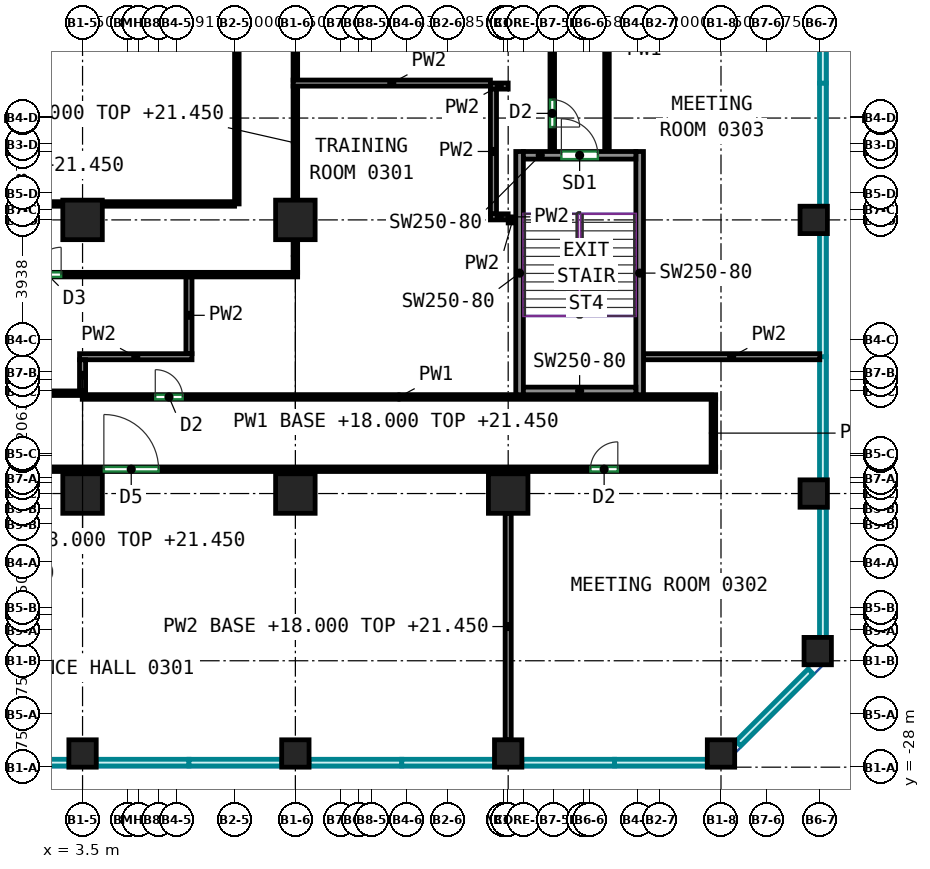
"""IFC4 building model, lengths in metres.
Left out: names, types, materials, properties, quantities, classifications, styles, units other than length and angle.
Written with IfcOpenShell. Run it as: python <this file> out.ifc"""

import sys

from ifc_helpers import new_model, si_unit, direction, frame, frame_2d, origin, origin_2d, place, context, subcontext, project, spatial, rectangle, extrude, source, transform, mapped, element, fill, save


model = new_model("IFC4")
c1 = context("Model", 3, precision=1e-05, world=origin(), true_north=direction((0.0, 1.0)))
c2 = subcontext(c1, "Body", "Model", "MODEL_VIEW")
j1 = project(units=[si_unit("LENGTHUNIT", "METRE"), si_unit("PLANEANGLEUNIT", "RADIAN")], contexts=[c1])
p1 = place(None, origin())
s1 = spatial("IfcSite", under=j1, at=p1, CompositionType="ELEMENT")
p2 = place(p1, origin())
s2 = spatial("IfcBuilding", under=s1, at=p2, CompositionType="ELEMENT")
p3 = place(p2, frame((0.0, 0.0, 18.0)))
s3 = spatial("IfcBuildingStorey", under=s2, at=p3, CompositionType="ELEMENT", Elevation=18.0)
m1 = source(origin(), c2, "Body", "SweptSolid", [
    extrude(rectangle(XDim=0.9, YDim=0.9, at=origin_2d()), origin(), (0.0, 0.0, 1.0), 4.1),
])
p4 = place(p3, frame((3.5, -27.55, 0.0), z_axis=(0.0, 0.0, 1.0), x_axis=(1.0, 0.0, 0.0)))
e1 = element("IfcColumn", 1, at=p4, inside=s3, PredefinedType="COLUMN", context=c2, shape_type="MappedRepresentation", body=[
    mapped(m1, transform((0.0, 0.0, 0.0))),
])
m2 = source(origin(), c2, "Body", "SweptSolid", [
    extrude(rectangle(XDim=1.3, YDim=1.3, at=origin_2d()), origin(), (0.0, 0.0, 1.0), 4.1),
])
for number, where, z_axis, x_axis in (
    (2, (3.5, -19.0, 0.0), (0.0, 0.0, 1.0), (1.0, 0.0, 0.0)),
    (3, (3.5, -10.0, 0.0), (0.0, 0.0, 1.0), (1.0, 0.0, 0.0)),
):
    element("IfcColumn", number, at=place(p3, frame(where, z_axis=z_axis, x_axis=x_axis)), inside=s3, PredefinedType="COLUMN", context=c2, shape_type="MappedRepresentation", body=[
        mapped(m2, transform((0.0, 0.0, 0.0))),
    ])
p5 = place(p3, frame((10.5, -27.55, 0.0), z_axis=(0.0, 0.0, 1.0), x_axis=(1.0, 0.0, 0.0)))
e4 = element("IfcColumn", 4, at=p5, inside=s3, PredefinedType="COLUMN", context=c2, shape_type="MappedRepresentation", body=[
    mapped(m1, transform((0.0, 0.0, 0.0))),
])
for number, where, z_axis, x_axis in (
    (5, (10.5, -19.0, 0.0), (0.0, 0.0, 1.0), (1.0, 0.0, 0.0)),
    (6, (10.5, -10.0, 0.0), (0.0, 0.0, 1.0), (1.0, 0.0, 0.0)),
):
    element("IfcColumn", number, at=place(p3, frame(where, z_axis=z_axis, x_axis=x_axis)), inside=s3, PredefinedType="COLUMN", context=c2, shape_type="MappedRepresentation", body=[
        mapped(m2, transform((0.0, 0.0, 0.0))),
    ])
p6 = place(p3, frame((17.5, -27.55, 0.0), z_axis=(0.0, 0.0, 1.0), x_axis=(1.0, 0.0, 0.0)))
e7 = element("IfcColumn", 7, at=p6, inside=s3, PredefinedType="COLUMN", context=c2, shape_type="MappedRepresentation", body=[
    mapped(m1, transform((0.0, 0.0, 0.0))),
])
p7 = place(p3, frame((17.5, -19.0, 0.0), z_axis=(0.0, 0.0, 1.0), x_axis=(1.0, 0.0, 0.0)))
e8 = element("IfcColumn", 8, at=p7, inside=s3, PredefinedType="COLUMN", context=c2, shape_type="MappedRepresentation", body=[
    mapped(m2, transform((0.0, 0.0, 0.0))),
])
for number, where, z_axis, x_axis in (
    (9, (24.5, -27.55, 0.0), (0.0, 0.0, 1.0), (1.0, 0.0, 0.0)),
    (10, (27.55, -19.0, 0.0), (0.0, 0.0, 1.0), (1.0, 0.0, 0.0)),
    (11, (27.55, -10.0, 0.0), (0.0, 0.0, 1.0), (1.0, 0.0, 0.0)),
    (12, (27.682, -24.182, 0.0), (0.0, 0.0, 1.0), (1.0, 0.0, 0.0)),
):
    element("IfcColumn", number, at=place(p3, frame(where, z_axis=z_axis, x_axis=x_axis)), inside=s3, PredefinedType="COLUMN", context=c2, shape_type="MappedRepresentation", body=[
        mapped(m1, transform((0.0, 0.0, 0.0))),
    ])
m3 = source(origin(), c2, "Body", "SweptSolid", [
    extrude(rectangle(XDim=8.0, YDim=0.25, at=frame_2d((4.0, 0.0))), origin(), (0.0, 0.0, 1.0), 4.1),
])
for number, where, z_axis, x_axis in (
    (13, (17.875, -15.75, 0.0), (0.0, 0.0, 1.0), (0.0, 1.0, 0.0)),
    (14, (21.825, -15.75, 0.0), (0.0, 0.0, 1.0), (0.0, 1.0, 0.0)),
):
    element("IfcWall", number, at=place(p3, frame(where, z_axis=z_axis, x_axis=x_axis)), inside=s3, PredefinedType="SHEAR", context=c2, shape_type="MappedRepresentation", body=[
        mapped(m3, transform((0.0, 0.0, 0.0))),
    ])
m4 = source(origin(), c2, "Body", "SweptSolid", [
    extrude(rectangle(XDim=3.7, YDim=0.25, at=frame_2d((1.85, 0.0))), origin(), (0.0, 0.0, 1.0), 4.1),
])
p8 = place(p3, frame((18.0, -15.625, 0.0), z_axis=(0.0, 0.0, 1.0), x_axis=(1.0, 0.0, 0.0)))
e15 = element("IfcWall", 15, at=p8, inside=s3, PredefinedType="SHEAR", context=c2, shape_type="MappedRepresentation", body=[
    mapped(m4, transform((0.0, 0.0, 0.0))),
])
p9 = place(p3, frame((18.0, -7.875, 0.0), z_axis=(0.0, 0.0, 1.0), x_axis=(1.0, 0.0, 0.0)))
e16 = element("IfcWall", 16, at=p9, inside=s3, PredefinedType="SHEAR", context=c2, shape_type="MappedRepresentation", body=[
    mapped(m4, transform((0.0, 0.0, 0.0))),
])
p10 = place(p9, frame((1.25, 0.0, 0.0)))
e17 = element("IfcOpeningElement", 17, at=p10, cuts=e16, PredefinedType="OPENING", context=c2, shape_type="SweptSolid", body=[
    extrude(rectangle(XDim=1.2, YDim=2.1, at=frame_2d((0.6, 1.05))), frame((0.0, 0.135, 0.0), z_axis=(0.0, -1.0, 0.0), x_axis=(1.0, 0.0, 0.0)), (0.0, 0.0, 1.0), 0.27),
])
p11 = place(p3, frame((-24.325, -18.2, 0.0), z_axis=(0.0, 0.0, 1.0), x_axis=(1.0, 0.0, 0.0)))
e18 = element("IfcWall", 18, at=p11, inside=s3, PredefinedType="PARTITIONING", context=c2, shape_type="SweptSolid", body=[
    extrude(rectangle(XDim=48.65, YDim=0.15, at=frame_2d((24.325, 0.0))), origin(), (0.0, 0.0, 1.0), 4.1),
])
p12 = place(p11, frame((7.818, 0.0, 0.0)))
e19 = element("IfcOpeningElement", 19, at=p12, cuts=e18, PredefinedType="OPENING", context=c2, shape_type="SweptSolid", body=[
    extrude(rectangle(XDim=0.9, YDim=2.1, at=frame_2d((0.45, 1.05))), frame((0.0, 0.085, 0.0), z_axis=(0.0, -1.0, 0.0), x_axis=(1.0, 0.0, 0.0)), (0.0, 0.0, 1.0), 0.17),
])
p13 = place(p11, frame((28.526, 0.0, 0.0)))
e20 = element("IfcOpeningElement", 20, at=p13, cuts=e18, PredefinedType="OPENING", context=c2, shape_type="SweptSolid", body=[
    extrude(rectangle(XDim=1.8, YDim=2.1, at=frame_2d((0.9, 1.05))), frame((0.0, 0.085, 0.0), z_axis=(0.0, -1.0, 0.0), x_axis=(1.0, 0.0, 0.0)), (0.0, 0.0, 1.0), 0.17),
])
p14 = place(p11, frame((44.531, 0.0, 0.0)))
e21 = element("IfcOpeningElement", 21, at=p14, cuts=e18, PredefinedType="OPENING", context=c2, shape_type="SweptSolid", body=[
    extrude(rectangle(XDim=0.9, YDim=2.1, at=frame_2d((0.45, 1.05))), frame((0.0, 0.085, 0.0), z_axis=(0.0, -1.0, 0.0), x_axis=(1.0, 0.0, 0.0)), (0.0, 0.0, 1.0), 0.17),
])
p15 = place(p3, frame((-5.875, -11.8, 0.0), z_axis=(0.0, 0.0, 1.0), x_axis=(1.0, 0.0, 0.0)))
e22 = element("IfcWall", 22, at=p15, inside=s3, PredefinedType="PARTITIONING", context=c2, shape_type="SweptSolid", body=[
    extrude(rectangle(XDim=16.45, YDim=0.15, at=frame_2d((8.225, 0.0))), origin(), (0.0, 0.0, 1.0), 4.1),
])
p16 = place(p15, frame((0.811, 0.0, 0.0)))
e23 = element("IfcOpeningElement", 23, at=p16, cuts=e22, PredefinedType="OPENING", context=c2, shape_type="SweptSolid", body=[
    extrude(rectangle(XDim=0.9, YDim=2.1, at=frame_2d((0.45, 1.05))), frame((0.0, 0.085, 0.0), z_axis=(0.0, -1.0, 0.0), x_axis=(1.0, 0.0, 0.0)), (0.0, 0.0, 1.0), 0.17),
])
p17 = place(p15, frame((7.771, 0.0, 0.0)))
e24 = element("IfcOpeningElement", 24, at=p17, cuts=e22, PredefinedType="OPENING", context=c2, shape_type="SweptSolid", body=[
    extrude(rectangle(XDim=0.9, YDim=2.1, at=frame_2d((0.45, 1.05))), frame((0.0, 0.085, 0.0), z_axis=(0.0, -1.0, 0.0), x_axis=(1.0, 0.0, 0.0)), (0.0, 0.0, 1.0), 0.17),
])
p18 = place(p3, frame((-5.875, -15.7, 0.0), z_axis=(0.0, 0.0, 1.0), x_axis=(1.0, 0.0, 0.0)))
e25 = element("IfcWall", 25, at=p18, inside=s3, PredefinedType="PARTITIONING", context=c2, shape_type="SweptSolid", body=[
    extrude(rectangle(XDim=9.385, YDim=0.15, at=frame_2d((4.692, 0.0))), origin(), (0.0, 0.0, 1.0), 4.1),
])
p19 = place(p3, frame((10.5, -9.35, 0.0), z_axis=(0.0, 0.0, 1.0), x_axis=(0.0, 1.0, 0.0)))
e26 = element("IfcWall", 26, at=p19, inside=s3, PredefinedType="PARTITIONING", context=c2, shape_type="SweptSolid", body=[
    extrude(rectangle(XDim=3.76, YDim=0.15, at=frame_2d((1.88, 0.0))), origin(), (0.0, 0.0, 1.0), 3.45),
])
p20 = place(p3, frame((10.5, -11.725, 0.0), z_axis=(0.0, 0.0, 1.0), x_axis=(0.0, 1.0, 0.0)))
e27 = element("IfcWall", 27, at=p20, inside=s3, PredefinedType="PARTITIONING", context=c2, shape_type="SweptSolid", body=[
    extrude(rectangle(XDim=1.075, YDim=0.15, at=frame_2d((0.538, 0.0))), origin(), (0.0, 0.0, 1.0), 3.45),
])
p21 = place(p3, frame((3.49, -15.825, 0.0), z_axis=(0.0, 0.0, 1.0), x_axis=(1.0, 0.0, 0.0)))
e28 = element("IfcWall", 28, at=p21, inside=s3, PredefinedType="PARTITIONING", context=c2, shape_type="SweptSolid", body=[
    extrude(rectangle(XDim=20.835, YDim=0.15, at=frame_2d((10.417, 0.0))), origin(), (0.0, 0.0, 1.0), 4.1),
])
p22 = place(p21, frame((2.402, 0.0, 0.0)))
e29 = element("IfcOpeningElement", 29, at=p22, cuts=e28, PredefinedType="OPENING", context=c2, shape_type="SweptSolid", body=[
    extrude(rectangle(XDim=0.9, YDim=2.1, at=frame_2d((0.45, 1.05))), frame((0.0, 0.085, 0.0), z_axis=(0.0, -1.0, 0.0), x_axis=(1.0, 0.0, 0.0)), (0.0, 0.0, 1.0), 0.17),
])
p23 = place(p3, frame((24.25, -18.125, 0.0), z_axis=(0.0, 0.0, 1.0), x_axis=(0.0, 1.0, 0.0)))
e30 = element("IfcWall", 30, at=p23, inside=s3, PredefinedType="PARTITIONING", context=c2, shape_type="SweptSolid", body=[
    extrude(rectangle(XDim=2.225, YDim=0.15, at=frame_2d((1.113, 0.0))), origin(), (0.0, 0.0, 1.0), 3.45),
])
p24 = place(p3, frame((20.75, -7.75, 0.0), z_axis=(0.0, 0.0, 1.0), x_axis=(0.0, 1.0, 0.0)))
e31 = element("IfcWall", 31, at=p24, inside=s3, PredefinedType="PARTITIONING", context=c2, shape_type="SweptSolid", body=[
    extrude(rectangle(XDim=6.66, YDim=0.15, at=frame_2d((3.33, 0.0))), origin(), (0.0, 0.0, 1.0), 4.1),
])
p25 = place(p24, frame((4.448, 0.0, 0.0)))
e32 = element("IfcOpeningElement", 32, at=p25, cuts=e31, PredefinedType="OPENING", context=c2, shape_type="SweptSolid", body=[
    extrude(rectangle(XDim=0.9, YDim=2.1, at=frame_2d((0.45, 1.05))), frame((0.0, 0.085, 0.0), z_axis=(0.0, -1.0, 0.0), x_axis=(1.0, 0.0, 0.0)), (0.0, 0.0, 1.0), 0.17),
])
p26 = place(p3, frame((10.5, -5.41, 0.0), z_axis=(0.0, 0.0, 1.0), x_axis=(0.0, 1.0, 0.0)))
e33 = element("IfcWall", 33, at=p26, inside=s3, PredefinedType="PARTITIONING", context=c2, shape_type="SweptSolid", body=[
    extrude(rectangle(XDim=3.76, YDim=0.15, at=frame_2d((1.88, 0.0))), origin(), (0.0, 0.0, 1.0), 3.45),
])
p27 = place(p3, frame((18.95, 5.525, 0.0), z_axis=(0.0, 0.0, 1.0), x_axis=(0.0, -1.0, 0.0)))
e34 = element("IfcWall", 34, at=p27, inside=s3, PredefinedType="PARTITIONING", context=c2, shape_type="SweptSolid", body=[
    extrude(rectangle(XDim=13.275, YDim=0.15, at=frame_2d((6.637, 0.0))), origin(), (0.0, 0.0, 1.0), 4.1),
])
p28 = place(p27, frame((11.571, 0.0, 0.0)))
e35 = element("IfcOpeningElement", 35, at=p28, cuts=e34, PredefinedType="OPENING", context=c2, shape_type="SweptSolid", body=[
    extrude(rectangle(XDim=0.9, YDim=2.1, at=frame_2d((0.45, 1.05))), frame((0.0, 0.085, 0.0), z_axis=(0.0, -1.0, 0.0), x_axis=(1.0, 0.0, 0.0)), (0.0, 0.0, 1.0), 0.17),
])
p29 = place(p3, frame((17.5, -27.1, 0.0), z_axis=(0.0, 0.0, 1.0), x_axis=(0.0, 1.0, 0.0)))
e36 = element("IfcWall", 36, at=p29, inside=s3, PredefinedType="PARTITIONING", context=c2, shape_type="SweptSolid", body=[
    extrude(rectangle(XDim=7.45, YDim=0.2, at=frame_2d((3.725, 0.0))), origin(), (0.0, 0.0, 1.0), 3.45),
])
p30 = place(p3, frame((7.0, -14.4, 0.0), z_axis=(0.0, 0.0, 1.0), x_axis=(0.0, 1.0, 0.0)))
e37 = element("IfcWall", 37, at=p30, inside=s3, PredefinedType="PARTITIONING", context=c2, shape_type="SweptSolid", body=[
    extrude(rectangle(XDim=2.524, YDim=0.2, at=frame_2d((1.262, 0.0))), origin(), (0.0, 0.0, 1.0), 4.1),
])
p31 = place(p3, frame((3.4, -14.5, 0.0), z_axis=(0.0, 0.0, 1.0), x_axis=(1.0, 0.0, 0.0)))
e38 = element("IfcWall", 38, at=p31, inside=s3, PredefinedType="PARTITIONING", context=c2, shape_type="SweptSolid", body=[
    extrude(rectangle(XDim=3.7, YDim=0.2, at=frame_2d((1.85, 0.0))), origin(), (0.0, 0.0, 1.0), 4.1),
])
p32 = place(p3, frame((3.5, -15.624, 0.0), z_axis=(0.0, 0.0, 1.0), x_axis=(0.0, 1.0, 0.0)))
e39 = element("IfcWall", 39, at=p32, inside=s3, PredefinedType="PARTITIONING", context=c2, shape_type="SweptSolid", body=[
    extrude(rectangle(XDim=1.024, YDim=0.2, at=frame_2d((0.512, 0.0))), origin(), (0.0, 0.0, 1.0), 3.45),
])
p33 = place(p3, frame((10.426, -5.5, 0.0), z_axis=(0.0, 0.0, 1.0), x_axis=(1.0, 0.0, 0.0)))
e40 = element("IfcWall", 40, at=p33, inside=s3, PredefinedType="PARTITIONING", context=c2, shape_type="SweptSolid", body=[
    extrude(rectangle(XDim=6.49, YDim=0.2, at=frame_2d((3.245, 0.0))), origin(), (0.0, 0.0, 1.0), 4.1),
])
p34 = place(p3, frame((16.916, -5.598, 0.0), z_axis=(0.0, 0.0, 1.0), x_axis=(1.0, 0.0, 0.0)))
e41 = element("IfcWall", 41, at=p34, inside=s3, PredefinedType="PARTITIONING", context=c2, shape_type="SweptSolid", body=[
    extrude(rectangle(XDim=0.584, YDim=0.2, at=frame_2d((0.292, 0.0))), origin(), (0.0, 0.0, 1.0), 4.1),
])
p35 = place(p3, frame((17.016, -9.8, 0.0), z_axis=(0.0, 0.0, 1.0), x_axis=(0.0, 1.0, 0.0)))
e42 = element("IfcWall", 42, at=p35, inside=s3, PredefinedType="PARTITIONING", context=c2, shape_type="SweptSolid", body=[
    extrude(rectangle(XDim=4.102, YDim=0.2, at=frame_2d((2.051, 0.0))), origin(), (0.0, 0.0, 1.0), 4.1),
])
p36 = place(p3, frame((17.5, -9.9, 0.0), z_axis=(0.0, 0.0, 1.0), x_axis=(-1.0, 0.0, 0.0)))
e43 = element("IfcWall", 43, at=p36, inside=s3, PredefinedType="PARTITIONING", context=c2, shape_type="SweptSolid", body=[
    extrude(rectangle(XDim=0.584, YDim=0.2, at=frame_2d((0.292, 0.0))), origin(), (0.0, 0.0, 1.0), 4.1),
])
p37 = place(p3, frame((17.8, -10.0, 0.0), z_axis=(0.0, 0.0, 1.0), x_axis=(-1.0, 0.0, 0.0)))
e44 = element("IfcWall", 44, at=p37, inside=s3, PredefinedType="PARTITIONING", context=c2, shape_type="SweptSolid", body=[
    extrude(rectangle(XDim=0.3, YDim=0.2, at=frame_2d((0.15, 0.0))), origin(), (0.0, 0.0, 1.0), 4.1),
])
p38 = place(p3, frame((21.95, -14.5, 0.0), z_axis=(0.0, 0.0, 1.0), x_axis=(1.0, 0.0, 0.0)))
e45 = element("IfcWall", 45, at=p38, inside=s3, PredefinedType="PARTITIONING", context=c2, shape_type="SweptSolid", body=[
    extrude(rectangle(XDim=5.8, YDim=0.2, at=frame_2d((2.9, 0.0))), origin(), (0.0, 0.0, 1.0), 4.1),
])
p39 = place(p3, frame((8.5, -9.475, 0.0), z_axis=(0.0, 0.0, 1.0), x_axis=(-1.0, 0.0, 0.0)))
e46 = element("IfcWall", 46, at=p39, inside=s3, PredefinedType="PARTITIONING", context=c2, shape_type="SweptSolid", body=[
    extrude(rectangle(XDim=15.075, YDim=0.15, at=frame_2d((7.538, 0.0))), origin(), (0.0, 0.0, 1.0), 4.1),
])
p40 = place(p3, frame((8.575, 5.675, 0.0), z_axis=(0.0, 0.0, 1.0), x_axis=(0.0, -1.0, 0.0)))
e47 = element("IfcWall", 47, at=p40, inside=s3, PredefinedType="PARTITIONING", context=c2, shape_type="SweptSolid", body=[
    extrude(rectangle(XDim=15.15, YDim=0.15, at=frame_2d((7.575, 0.0))), origin(), (0.0, 0.0, 1.0), 4.1),
])
p41 = place(p10, origin())
e48 = element("IfcDoor", 48, at=p41, inside=s3, OperationType="DOUBLE_DOOR_SINGLE_SWING", PredefinedType="DOOR", context=c2, shape_type="SweptSolid", body=[
    extrude(rectangle(XDim=1.2, YDim=2.1, at=frame_2d((0.6, 1.05))), frame((0.0, 0.025, 0.0), z_axis=(0.0, -1.0, 0.0), x_axis=(1.0, 0.0, 0.0)), (0.0, 0.0, 1.0), 0.05),
])
fill(e17, e48)
p42 = place(p13, origin())
e49 = element("IfcDoor", 49, at=p42, inside=s3, OperationType="DOUBLE_DOOR_SINGLE_SWING", PredefinedType="DOOR", context=c2, shape_type="SweptSolid", body=[
    extrude(rectangle(XDim=1.8, YDim=2.1, at=frame_2d((0.9, 1.05))), frame((0.0, 0.025, 0.0), z_axis=(0.0, -1.0, 0.0), x_axis=(1.0, 0.0, 0.0)), (0.0, 0.0, 1.0), 0.05),
])
fill(e20, e49)
p43 = place(p14, origin())
e50 = element("IfcDoor", 50, at=p43, inside=s3, OperationType="SINGLE_SWING_RIGHT", PredefinedType="DOOR", context=c2, shape_type="SweptSolid", body=[
    extrude(rectangle(XDim=0.9, YDim=2.1, at=frame_2d((0.45, 1.05))), frame((0.0, 0.025, 0.0), z_axis=(0.0, -1.0, 0.0), x_axis=(1.0, 0.0, 0.0)), (0.0, 0.0, 1.0), 0.05),
])
fill(e21, e50)
p44 = place(p22, origin())
e51 = element("IfcDoor", 51, at=p44, inside=s3, OperationType="SINGLE_SWING_LEFT", PredefinedType="DOOR", context=c2, shape_type="SweptSolid", body=[
    extrude(rectangle(XDim=0.9, YDim=2.1, at=frame_2d((0.45, 1.05))), frame((0.0, 0.025, 0.0), z_axis=(0.0, -1.0, 0.0), x_axis=(1.0, 0.0, 0.0)), (0.0, 0.0, 1.0), 0.05),
])
fill(e29, e51)
p45 = place(p17, origin())
e52 = element("IfcDoor", 52, at=p45, inside=s3, OperationType="SINGLE_SWING_RIGHT", PredefinedType="DOOR", context=c2, shape_type="SweptSolid", body=[
    extrude(rectangle(XDim=0.9, YDim=2.1, at=frame_2d((0.45, 1.05))), frame((0.0, 0.025, 0.0), z_axis=(0.0, -1.0, 0.0), x_axis=(1.0, 0.0, 0.0)), (0.0, 0.0, 1.0), 0.05),
])
fill(e24, e52)
p46 = place(p28, origin())
e53 = element("IfcDoor", 53, at=p46, inside=s3, OperationType="SINGLE_SWING_RIGHT", PredefinedType="DOOR", context=c2, shape_type="SweptSolid", body=[
    extrude(rectangle(XDim=0.9, YDim=2.1, at=frame_2d((0.45, 1.05))), frame((0.0, 0.025, 0.0), z_axis=(0.0, -1.0, 0.0), x_axis=(1.0, 0.0, 0.0)), (0.0, 0.0, 1.0), 0.05),
])
fill(e35, e53)
save(model, sys.argv[1])
